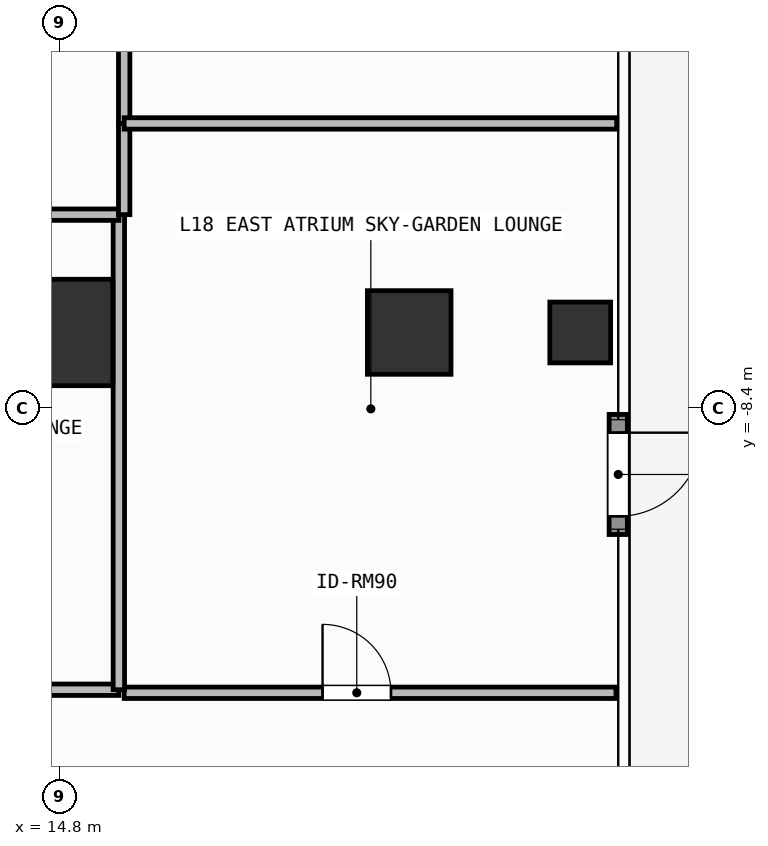
"""IFC4 building model, lengths in metres.
Left out: names, types, materials, properties, quantities, classifications, styles, units other than length and angle.
Written with IfcOpenShell. Run it as: python <this file> out.ifc"""

import sys

from ifc_helpers import new_model, si_unit, direction, frame, frame_2d, origin, origin_2d, place, context, subcontext, project, spatial, rectangle, hollow_rectangle, extrude, element, fill, save


model = new_model("IFC4")
c1 = context("Model", 3, precision=1e-05, world=origin(), true_north=direction((0.0, 1.0)))
c2 = subcontext(c1, "Body", "Model", "MODEL_VIEW")
j1 = project(units=[si_unit("LENGTHUNIT", "METRE"), si_unit("PLANEANGLEUNIT", "RADIAN")], contexts=[c1])
p1 = place(None, origin())
s1 = spatial("IfcSite", under=j1, at=p1, CompositionType="ELEMENT")
p2 = place(p1, origin())
s2 = spatial("IfcBuilding", under=s1, at=p2, CompositionType="ELEMENT")
p3 = place(p2, frame((0.0, 0.0, 69.6)))
s3 = spatial("IfcBuildingStorey", under=s2, at=p3, CompositionType="ELEMENT", Elevation=69.6)
p4 = place(p3, frame((14.8, -7.4, 0.0), z_axis=(0.0, 0.0, 1.0), x_axis=(1.0, 0.0, 0.0)))
e1 = element("IfcColumn", 1, at=p4, inside=s3, PredefinedType="COLUMN", context=c2, shape_type="SweptSolid", body=[
    extrude(rectangle(XDim=1.4, YDim=1.4, at=origin_2d()), origin(), (0.0, 0.0, 1.0), 3.9),
])
p5 = place(p3, frame((19.4, -7.4, 0.0), z_axis=(0.0, 0.0, 1.0), x_axis=(1.0, 0.0, 0.0)))
e2 = element("IfcColumn", 2, at=p5, inside=s3, PredefinedType="COLUMN", context=c2, shape_type="SweptSolid", body=[
    extrude(rectangle(XDim=1.1, YDim=1.1, at=origin_2d()), origin(), (0.0, 0.0, 1.0), 3.9),
])
p6 = place(p3, frame((21.65, -7.4, 0.0), z_axis=(0.0, 0.0, 1.0), x_axis=(1.0, 0.0, 0.0)))
e3 = element("IfcColumn", 3, at=p6, inside=s3, PredefinedType="COLUMN", context=c2, shape_type="SweptSolid", body=[
    extrude(hollow_rectangle(XDim=0.8, YDim=0.8, WallThickness=0.036, at=origin_2d()), origin(), (0.0, 0.0, 1.0), 3.9),
])
p7 = place(p3, frame((22.15, -8.478, 0.0), z_axis=(0.0, 0.0, 1.0), x_axis=(0.0, -1.0, 0.0)))
e4 = element("IfcWall", 4, at=p7, inside=s3, PredefinedType="SOLIDWALL", context=c2, shape_type="SweptSolid", body=[
    extrude(rectangle(XDim=1.58, YDim=0.24, at=frame_2d((0.79, 0.0))), origin(), (0.0, 0.0, 1.0), 3.68),
])
p8 = place(p7, frame((0.24, 0.0, 0.0)))
e5 = element("IfcOpeningElement", 5, at=p8, cuts=e4, PredefinedType="OPENING", context=c2, shape_type="SweptSolid", body=[
    extrude(rectangle(XDim=1.1, YDim=2.2, at=frame_2d((0.55, 1.1))), frame((0.0, 0.13, 0.0), z_axis=(0.0, -1.0, 0.0), x_axis=(1.0, 0.0, 0.0)), (0.0, 0.0, 1.0), 0.26),
])
p9 = place(p3, frame((10.1, -12.1, 0.0), z_axis=(0.0, 0.0, 1.0), x_axis=(1.0, 0.0, 0.0)))
e6 = element("IfcWall", 6, at=p9, inside=s3, PredefinedType="PARTITIONING", context=c2, shape_type="SweptSolid", body=[
    extrude(rectangle(XDim=5.48, YDim=0.15, at=frame_2d((2.74, 0.0))), origin(), (0.0, 0.0, 1.0), 3.68),
])
p10 = place(p9, frame((2.29, 0.0, 0.0)))
e7 = element("IfcOpeningElement", 7, at=p10, cuts=e6, PredefinedType="OPENING", context=c2, shape_type="SweptSolid", body=[
    extrude(rectangle(XDim=0.9, YDim=2.1, at=frame_2d((0.45, 1.05))), frame((0.0, 0.085, 0.0), z_axis=(0.0, -1.0, 0.0), x_axis=(1.0, 0.0, 0.0)), (0.0, 0.0, 1.0), 0.17),
])
p11 = place(p3, frame((15.65, -12.14, 0.0), z_axis=(0.0, 0.0, 1.0), x_axis=(1.0, 0.0, 0.0)))
e8 = element("IfcWall", 8, at=p11, inside=s3, PredefinedType="PARTITIONING", context=c2, shape_type="SweptSolid", body=[
    extrude(rectangle(XDim=6.47, YDim=0.15, at=frame_2d((3.235, 0.0))), origin(), (0.0, 0.0, 1.0), 3.68),
])
p12 = place(p11, frame((2.61, 0.0, 0.0)))
e9 = element("IfcOpeningElement", 9, at=p12, cuts=e8, PredefinedType="OPENING", context=c2, shape_type="SweptSolid", body=[
    extrude(rectangle(XDim=0.9, YDim=2.1, at=frame_2d((0.45, 1.05))), frame((0.0, 0.085, 0.0), z_axis=(0.0, -1.0, 0.0), x_axis=(1.0, 0.0, 0.0)), (0.0, 0.0, 1.0), 0.17),
])
p13 = place(p3, frame((15.58, -12.1, 0.0), z_axis=(0.0, 0.0, 1.0), x_axis=(0.0, 1.0, 0.0)))
e10 = element("IfcWall", 10, at=p13, inside=s3, PredefinedType="PARTITIONING", context=c2, shape_type="SweptSolid", body=[
    extrude(rectangle(XDim=6.25, YDim=0.15, at=frame_2d((3.125, 0.0))), origin(), (0.0, 0.0, 1.0), 3.68),
])
p14 = place(p3, frame((8.96, -5.85, 0.0), z_axis=(0.0, 0.0, 1.0), x_axis=(1.0, 0.0, 0.0)))
e11 = element("IfcWall", 11, at=p14, inside=s3, PredefinedType="PARTITIONING", context=c2, shape_type="SweptSolid", body=[
    extrude(rectangle(XDim=6.62, YDim=0.15, at=frame_2d((3.31, 0.0))), origin(), (0.0, 0.0, 1.0), 3.68),
])
p15 = place(p3, frame((15.65, -5.85, 0.0), z_axis=(0.0, 0.0, 1.0), x_axis=(0.0, 1.0, 0.0)))
e12 = element("IfcWall", 12, at=p15, inside=s3, PredefinedType="PARTITIONING", context=c2, shape_type="SweptSolid", body=[
    extrude(rectangle(XDim=1.2, YDim=0.15, at=frame_2d((0.6, 0.0))), origin(), (0.0, 0.0, 1.0), 3.68),
])
p16 = place(p3, frame((15.65, -4.65, 0.0), z_axis=(0.0, 0.0, 1.0), x_axis=(0.0, 1.0, 0.0)))
e13 = element("IfcWall", 13, at=p16, inside=s3, PredefinedType="PARTITIONING", context=c2, shape_type="SweptSolid", body=[
    extrude(rectangle(XDim=10.5, YDim=0.15, at=frame_2d((5.25, 0.0))), origin(), (0.0, 0.0, 1.0), 3.68),
])
p17 = place(p3, frame((15.65, -4.65, 0.0), z_axis=(0.0, 0.0, 1.0), x_axis=(1.0, 0.0, 0.0)))
e14 = element("IfcWall", 14, at=p17, inside=s3, PredefinedType="PARTITIONING", context=c2, shape_type="SweptSolid", body=[
    extrude(rectangle(XDim=6.48, YDim=0.15, at=frame_2d((3.24, 0.0))), origin(), (0.0, 0.0, 1.0), 3.68),
])
p18 = place(p8, origin())
e15 = element("IfcDoor", 15, at=p18, inside=s3, OperationType="SINGLE_SWING_LEFT", PredefinedType="DOOR", context=c2, shape_type="SweptSolid", body=[
    extrude(rectangle(XDim=1.1, YDim=2.2, at=frame_2d((0.55, 1.1))), frame((0.0, 0.025, 0.0), z_axis=(0.0, -1.0, 0.0), x_axis=(1.0, 0.0, 0.0)), (0.0, 0.0, 1.0), 0.05),
])
fill(e5, e15)
p19 = place(p12, origin())
e16 = element("IfcDoor", 16, at=p19, inside=s3, OperationType="SINGLE_SWING_LEFT", PredefinedType="DOOR", context=c2, shape_type="SweptSolid", body=[
    extrude(rectangle(XDim=0.9, YDim=2.1, at=frame_2d((0.45, 1.05))), frame((0.0, 0.025, 0.0), z_axis=(0.0, -1.0, 0.0), x_axis=(1.0, 0.0, 0.0)), (0.0, 0.0, 1.0), 0.05),
])
fill(e9, e16)
save(model, sys.argv[1])
